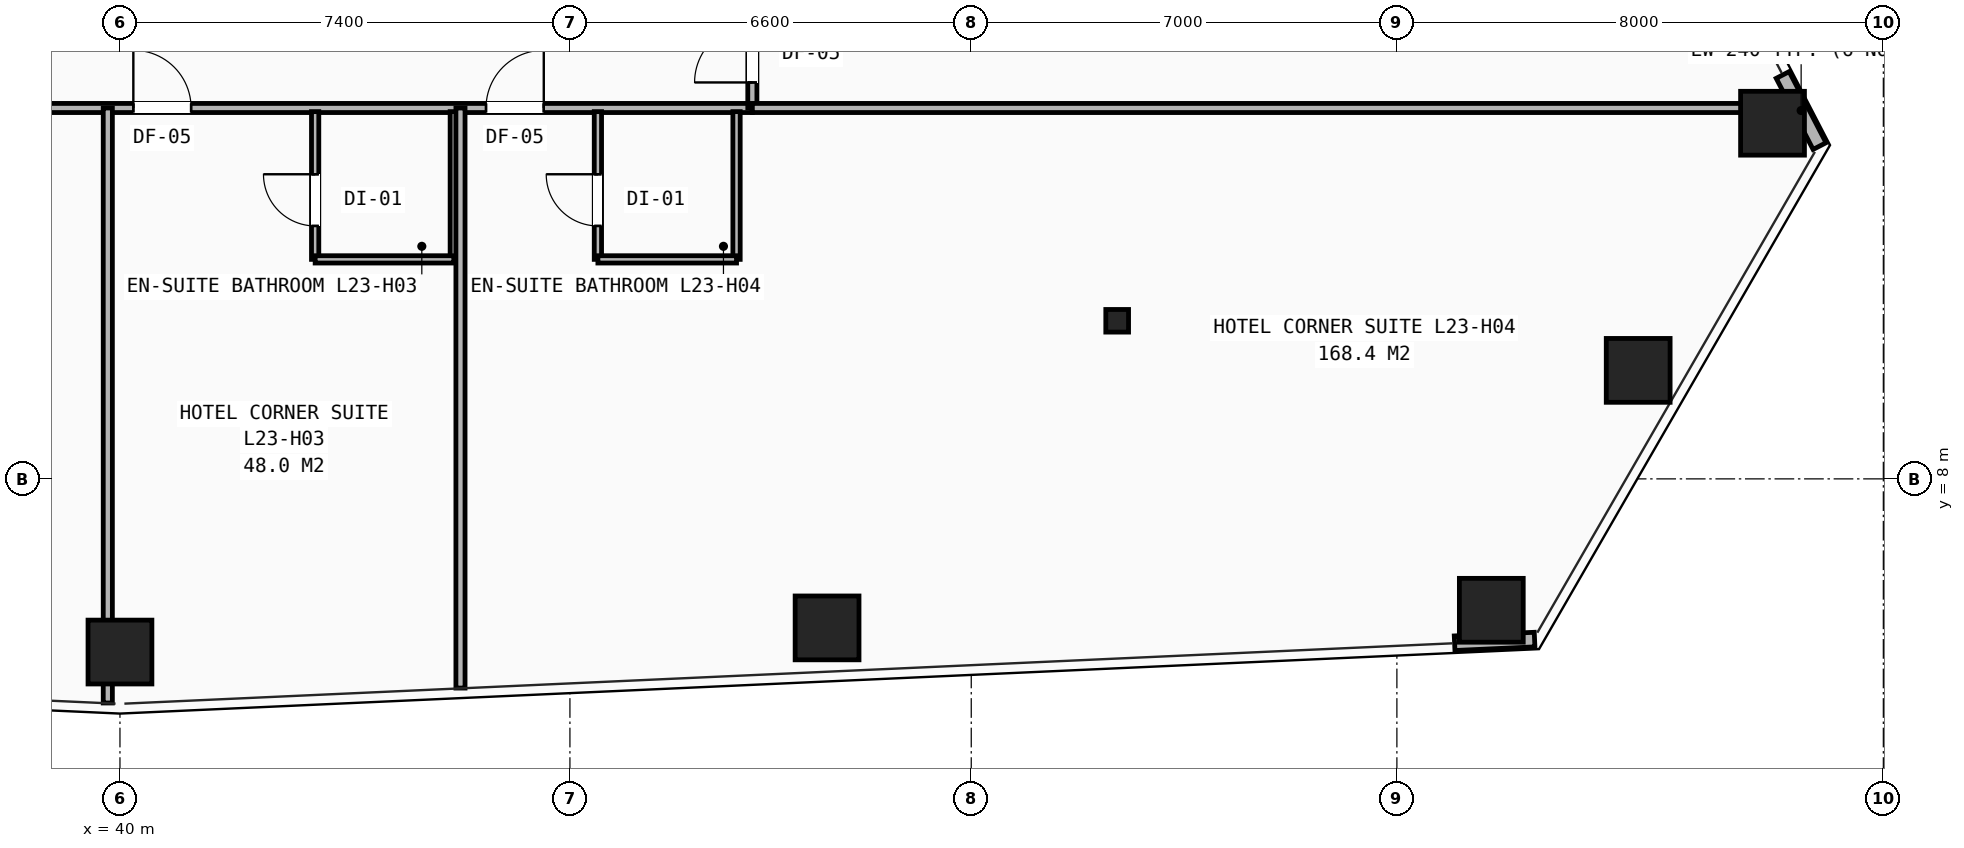
"""IFC4 building model, lengths in metres.
Left out: names, types, materials, properties, quantities, classifications, styles, units other than length and angle.
Written with IfcOpenShell. Run it as: python <this file> out.ifc"""

import sys

from ifc_helpers import new_model, si_unit, direction, frame, frame_2d, origin, origin_2d, place, context, subcontext, project, spatial, rectangle, hollow_rectangle, i_section, extrude, element, fill, save


model = new_model("IFC4")
c1 = context("Model", 3, precision=1e-05, world=origin(), true_north=direction((0.0, 1.0)))
c2 = subcontext(c1, "Body", "Model", "MODEL_VIEW")
j1 = project(units=[si_unit("LENGTHUNIT", "METRE"), si_unit("PLANEANGLEUNIT", "RADIAN")], contexts=[c1])
p1 = place(None, origin())
s1 = spatial("IfcSite", under=j1, at=p1, CompositionType="ELEMENT")
p2 = place(p1, origin())
s2 = spatial("IfcBuilding", under=s1, at=p2, CompositionType="ELEMENT")
p3 = place(p2, frame((0.0, 0.0, 83.0)))
s3 = spatial("IfcBuildingStorey", under=s2, at=p3, CompositionType="ELEMENT", Elevation=83.0)
p4 = place(p3, frame((56.4, 10.6, 0.0), z_axis=(0.0, 0.0, 1.0), x_axis=(1.0, 0.0, 0.0)))
e1 = element("IfcColumn", 1, at=p4, inside=s3, PredefinedType="COLUMN", context=c2, shape_type="SweptSolid", body=[
    extrude(i_section(OverallWidth=0.374, OverallDepth=0.372, WebThickness=0.016, FlangeThickness=0.026, at=origin_2d()), origin(), (0.0, 0.0, 1.0), 3.2),
])
for number, where, z_axis, x_axis in (
    (2, (40.0, 5.152, 0.0), (0.0, 0.0, 1.0), (1.0, 0.0, 0.0)),
    (3, (51.629, 5.549, 0.0), (0.0, 0.0, 1.0), (1.0, 0.0, 0.0)),
    (4, (62.553, 5.839, 0.0), (0.0, 0.0, 1.0), (1.0, 0.0, 0.0)),
    (5, (64.968, 9.784, 0.0), (0.0, 0.0, 1.0), (1.0, 0.0, 0.0)),
    (6, (67.177, 13.849, 0.0), (0.0, 0.0, 1.0), (1.0, 0.0, 0.0)),
):
    element("IfcColumn", number, at=place(p3, frame(where, z_axis=z_axis, x_axis=x_axis)), inside=s3, PredefinedType="COLUMN", context=c2, shape_type="SweptSolid", body=[
        extrude(hollow_rectangle(XDim=1.05, YDim=1.05, WallThickness=0.07, at=origin_2d()), origin(), (0.0, 0.0, 1.0), 3.2),
    ])
p5 = place(p3, frame((61.949, 5.297, 0.0), z_axis=(0.0, 0.0, 1.0), x_axis=(0.998967392838, 0.045432896092, 0.0)))
e7 = element("IfcWall", 7, at=p5, inside=s3, PredefinedType="SHEAR", context=c2, shape_type="SweptSolid", body=[
    extrude(rectangle(XDim=1.317, YDim=0.24, at=frame_2d((0.658, 0.0))), origin(), (0.0, 0.0, 1.0), 2.253),
])
p6 = place(p3, frame((67.951, 13.473, 0.0), z_axis=(0.0, 0.0, 1.0), x_axis=(-0.460138651144, 0.887847071135, 0.0)))
e8 = element("IfcWall", 8, at=p6, inside=s3, PredefinedType="SHEAR", context=c2, shape_type="SweptSolid", body=[
    extrude(rectangle(XDim=1.317, YDim=0.24, at=frame_2d((0.659, 0.0))), origin(), (0.0, 0.0, 1.0), 2.253),
])
p7 = place(p3, frame((29.6, 14.1, 0.0), z_axis=(0.0, 0.0, 1.0), x_axis=(1.0, 0.0, 0.0)))
e9 = element("IfcWall", 9, at=p7, inside=s3, PredefinedType="PARTITIONING", context=c2, shape_type="SweptSolid", body=[
    extrude(rectangle(XDim=20.8, YDim=0.15, at=frame_2d((10.4, 0.0))), origin(), (0.0, 0.0, 1.0), 2.421),
])
p8 = place(p7, frame((0.57, 0.0, 0.0)))
e10 = element("IfcOpeningElement", 10, at=p8, cuts=e9, PredefinedType="OPENING", context=c2, shape_type="SweptSolid", body=[
    extrude(rectangle(XDim=0.95, YDim=2.1, at=frame_2d((0.475, 1.05))), frame((0.0, 0.085, 0.0), z_axis=(0.0, -1.0, 0.0), x_axis=(1.0, 0.0, 0.0)), (0.0, 0.0, 1.0), 0.17),
])
p9 = place(p7, frame((5.02, 0.0, 0.0)))
e11 = element("IfcOpeningElement", 11, at=p9, cuts=e9, PredefinedType="OPENING", context=c2, shape_type="SweptSolid", body=[
    extrude(rectangle(XDim=0.95, YDim=2.1, at=frame_2d((0.475, 1.05))), frame((0.0, 0.085, 0.0), z_axis=(0.0, -1.0, 0.0), x_axis=(1.0, 0.0, 0.0)), (0.0, 0.0, 1.0), 0.17),
])
p10 = place(p7, frame((10.62, 0.0, 0.0)))
e12 = element("IfcOpeningElement", 12, at=p10, cuts=e9, PredefinedType="OPENING", context=c2, shape_type="SweptSolid", body=[
    extrude(rectangle(XDim=0.95, YDim=2.1, at=frame_2d((0.475, 1.05))), frame((0.0, 0.085, 0.0), z_axis=(0.0, -1.0, 0.0), x_axis=(1.0, 0.0, 0.0)), (0.0, 0.0, 1.0), 0.17),
])
p11 = place(p7, frame((16.42, 0.0, 0.0)))
e13 = element("IfcOpeningElement", 13, at=p11, cuts=e9, PredefinedType="OPENING", context=c2, shape_type="SweptSolid", body=[
    extrude(rectangle(XDim=0.95, YDim=2.1, at=frame_2d((0.475, 1.05))), frame((0.0, 0.085, 0.0), z_axis=(0.0, -1.0, 0.0), x_axis=(1.0, 0.0, 0.0)), (0.0, 0.0, 1.0), 0.17),
])
p12 = place(p3, frame((50.4, 14.1, 0.0), z_axis=(0.0, 0.0, 1.0), x_axis=(0.0, 1.0, 0.0)))
e14 = element("IfcWall", 14, at=p12, inside=s3, PredefinedType="PARTITIONING", context=c2, shape_type="SweptSolid", body=[
    extrude(rectangle(XDim=21.9, YDim=0.15, at=frame_2d((10.95, 0.0))), origin(), (0.0, 0.0, 1.0), 2.421),
])
p13 = place(p12, frame((0.42, 0.0, 0.0)))
e15 = element("IfcOpeningElement", 15, at=p13, cuts=e14, PredefinedType="OPENING", context=c2, shape_type="SweptSolid", body=[
    extrude(rectangle(XDim=0.95, YDim=2.1, at=frame_2d((0.475, 1.05))), frame((0.0, 0.085, 0.0), z_axis=(0.0, -1.0, 0.0), x_axis=(1.0, 0.0, 0.0)), (0.0, 0.0, 1.0), 0.17),
])
p14 = place(p12, frame((4.72, 0.0, 0.0)))
e16 = element("IfcOpeningElement", 16, at=p14, cuts=e14, PredefinedType="OPENING", context=c2, shape_type="SweptSolid", body=[
    extrude(rectangle(XDim=0.95, YDim=2.1, at=frame_2d((0.475, 1.05))), frame((0.0, 0.085, 0.0), z_axis=(0.0, -1.0, 0.0), x_axis=(1.0, 0.0, 0.0)), (0.0, 0.0, 1.0), 0.17),
])
p15 = place(p12, frame((9.12, 0.0, 0.0)))
e17 = element("IfcOpeningElement", 17, at=p15, cuts=e14, PredefinedType="OPENING", context=c2, shape_type="SweptSolid", body=[
    extrude(rectangle(XDim=0.95, YDim=2.1, at=frame_2d((0.475, 1.05))), frame((0.0, 0.085, 0.0), z_axis=(0.0, -1.0, 0.0), x_axis=(1.0, 0.0, 0.0)), (0.0, 0.0, 1.0), 0.17),
])
p16 = place(p12, frame((13.72, 0.0, 0.0)))
e18 = element("IfcOpeningElement", 18, at=p16, cuts=e14, PredefinedType="OPENING", context=c2, shape_type="SweptSolid", body=[
    extrude(rectangle(XDim=0.95, YDim=2.1, at=frame_2d((0.475, 1.05))), frame((0.0, 0.085, 0.0), z_axis=(0.0, -1.0, 0.0), x_axis=(1.0, 0.0, 0.0)), (0.0, 0.0, 1.0), 0.17),
])
p17 = place(p12, frame((18.12, 0.0, 0.0)))
e19 = element("IfcOpeningElement", 19, at=p17, cuts=e14, PredefinedType="OPENING", context=c2, shape_type="SweptSolid", body=[
    extrude(rectangle(XDim=0.95, YDim=2.1, at=frame_2d((0.475, 1.05))), frame((0.0, 0.085, 0.0), z_axis=(0.0, -1.0, 0.0), x_axis=(1.0, 0.0, 0.0)), (0.0, 0.0, 1.0), 0.17),
])
p18 = place(p3, frame((39.8, 4.314, 0.0), z_axis=(0.0, 0.0, 1.0), x_axis=(0.0, 1.0, 0.0)))
e20 = element("IfcWall", 20, at=p18, inside=s3, PredefinedType="PARTITIONING", context=c2, shape_type="SweptSolid", body=[
    extrude(rectangle(XDim=9.786, YDim=0.15, at=frame_2d((4.893, 0.0))), origin(), (0.0, 0.0, 1.0), 2.258),
])
p19 = place(p3, frame((43.21, 11.61, 0.0), z_axis=(0.0, 0.0, 1.0), x_axis=(0.0, 1.0, 0.0)))
e21 = element("IfcWall", 21, at=p19, inside=s3, PredefinedType="PARTITIONING", context=c2, shape_type="SweptSolid", body=[
    extrude(rectangle(XDim=2.43, YDim=0.12, at=frame_2d((1.215, 0.0))), origin(), (0.0, 0.0, 1.0), 2.97),
])
p20 = place(p19, frame((0.55, 0.0, 0.0)))
e22 = element("IfcOpeningElement", 22, at=p20, cuts=e21, PredefinedType="OPENING", context=c2, shape_type="SweptSolid", body=[
    extrude(rectangle(XDim=0.85, YDim=2.05, at=frame_2d((0.425, 1.025))), frame((0.0, 0.07, 0.0), z_axis=(0.0, -1.0, 0.0), x_axis=(1.0, 0.0, 0.0)), (0.0, 0.0, 1.0), 0.14),
])
p21 = place(p3, frame((45.49, 11.61, 0.0), z_axis=(0.0, 0.0, 1.0), x_axis=(0.0, 1.0, 0.0)))
e23 = element("IfcWall", 23, at=p21, inside=s3, PredefinedType="PARTITIONING", context=c2, shape_type="SweptSolid", body=[
    extrude(rectangle(XDim=2.43, YDim=0.12, at=frame_2d((1.215, 0.0))), origin(), (0.0, 0.0, 1.0), 2.97),
])
p22 = place(p3, frame((43.21, 11.61, 0.0), z_axis=(0.0, 0.0, 1.0), x_axis=(1.0, 0.0, 0.0)))
e24 = element("IfcWall", 24, at=p22, inside=s3, PredefinedType="PARTITIONING", context=c2, shape_type="SweptSolid", body=[
    extrude(rectangle(XDim=2.28, YDim=0.12, at=frame_2d((1.14, 0.0))), origin(), (0.0, 0.0, 1.0), 2.97),
])
p23 = place(p3, frame((45.6, 4.559, 0.0), z_axis=(0.0, 0.0, 1.0), x_axis=(0.0, 1.0, 0.0)))
e25 = element("IfcWall", 25, at=p23, inside=s3, PredefinedType="PARTITIONING", context=c2, shape_type="SweptSolid", body=[
    extrude(rectangle(XDim=9.541, YDim=0.15, at=frame_2d((4.771, 0.0))), origin(), (0.0, 0.0, 1.0), 2.258),
])
p24 = place(p3, frame((47.86, 11.61, 0.0), z_axis=(0.0, 0.0, 1.0), x_axis=(0.0, 1.0, 0.0)))
e26 = element("IfcWall", 26, at=p24, inside=s3, PredefinedType="PARTITIONING", context=c2, shape_type="SweptSolid", body=[
    extrude(rectangle(XDim=2.43, YDim=0.12, at=frame_2d((1.215, 0.0))), origin(), (0.0, 0.0, 1.0), 2.97),
])
p25 = place(p24, frame((0.55, 0.0, 0.0)))
e27 = element("IfcOpeningElement", 27, at=p25, cuts=e26, PredefinedType="OPENING", context=c2, shape_type="SweptSolid", body=[
    extrude(rectangle(XDim=0.85, YDim=2.05, at=frame_2d((0.425, 1.025))), frame((0.0, 0.07, 0.0), z_axis=(0.0, -1.0, 0.0), x_axis=(1.0, 0.0, 0.0)), (0.0, 0.0, 1.0), 0.14),
])
p26 = place(p3, frame((50.14, 11.61, 0.0), z_axis=(0.0, 0.0, 1.0), x_axis=(0.0, 1.0, 0.0)))
e28 = element("IfcWall", 28, at=p26, inside=s3, PredefinedType="PARTITIONING", context=c2, shape_type="SweptSolid", body=[
    extrude(rectangle(XDim=2.43, YDim=0.12, at=frame_2d((1.215, 0.0))), origin(), (0.0, 0.0, 1.0), 2.97),
])
p27 = place(p3, frame((47.86, 11.61, 0.0), z_axis=(0.0, 0.0, 1.0), x_axis=(1.0, 0.0, 0.0)))
e29 = element("IfcWall", 29, at=p27, inside=s3, PredefinedType="PARTITIONING", context=c2, shape_type="SweptSolid", body=[
    extrude(rectangle(XDim=2.28, YDim=0.12, at=frame_2d((1.14, 0.0))), origin(), (0.0, 0.0, 1.0), 2.97),
])
p28 = place(p3, frame((50.4, 14.1, 0.0), z_axis=(0.0, 0.0, 1.0), x_axis=(1.0, 0.0, 0.0)))
e30 = element("IfcWall", 30, at=p28, inside=s3, PredefinedType="PARTITIONING", context=c2, shape_type="SweptSolid", body=[
    extrude(rectangle(XDim=17.221, YDim=0.15, at=frame_2d((8.61, 0.0))), origin(), (0.0, 0.0, 1.0), 2.258),
])
p29 = place(p10, origin())
e31 = element("IfcDoor", 31, at=p29, inside=s3, OperationType="SINGLE_SWING_LEFT", PredefinedType="DOOR", context=c2, shape_type="SweptSolid", body=[
    extrude(rectangle(XDim=0.95, YDim=2.1, at=frame_2d((0.475, 1.05))), frame((0.0, 0.025, 0.0), z_axis=(0.0, -1.0, 0.0), x_axis=(1.0, 0.0, 0.0)), (0.0, 0.0, 1.0), 0.05),
])
fill(e12, e31)
p30 = place(p20, origin())
e32 = element("IfcDoor", 32, at=p30, inside=s3, OperationType="SINGLE_SWING_RIGHT", PredefinedType="DOOR", context=c2, shape_type="SweptSolid", body=[
    extrude(rectangle(XDim=0.85, YDim=2.05, at=frame_2d((0.425, 1.025))), frame((0.0, 0.025, 0.0), z_axis=(0.0, -1.0, 0.0), x_axis=(1.0, 0.0, 0.0)), (0.0, 0.0, 1.0), 0.05),
])
fill(e22, e32)
p31 = place(p11, origin())
e33 = element("IfcDoor", 33, at=p31, inside=s3, OperationType="SINGLE_SWING_RIGHT", PredefinedType="DOOR", context=c2, shape_type="SweptSolid", body=[
    extrude(rectangle(XDim=0.95, YDim=2.1, at=frame_2d((0.475, 1.05))), frame((0.0, 0.025, 0.0), z_axis=(0.0, -1.0, 0.0), x_axis=(1.0, 0.0, 0.0)), (0.0, 0.0, 1.0), 0.05),
])
fill(e13, e33)
p32 = place(p25, origin())
e34 = element("IfcDoor", 34, at=p32, inside=s3, OperationType="SINGLE_SWING_RIGHT", PredefinedType="DOOR", context=c2, shape_type="SweptSolid", body=[
    extrude(rectangle(XDim=0.85, YDim=2.05, at=frame_2d((0.425, 1.025))), frame((0.0, 0.025, 0.0), z_axis=(0.0, -1.0, 0.0), x_axis=(1.0, 0.0, 0.0)), (0.0, 0.0, 1.0), 0.05),
])
fill(e27, e34)
p33 = place(p13, origin())
e35 = element("IfcDoor", 35, at=p33, inside=s3, OperationType="SINGLE_SWING_LEFT", PredefinedType="DOOR", context=c2, shape_type="SweptSolid", body=[
    extrude(rectangle(XDim=0.95, YDim=2.1, at=frame_2d((0.475, 1.05))), frame((0.0, 0.025, 0.0), z_axis=(0.0, -1.0, 0.0), x_axis=(1.0, 0.0, 0.0)), (0.0, 0.0, 1.0), 0.05),
])
fill(e15, e35)
save(model, sys.argv[1])
